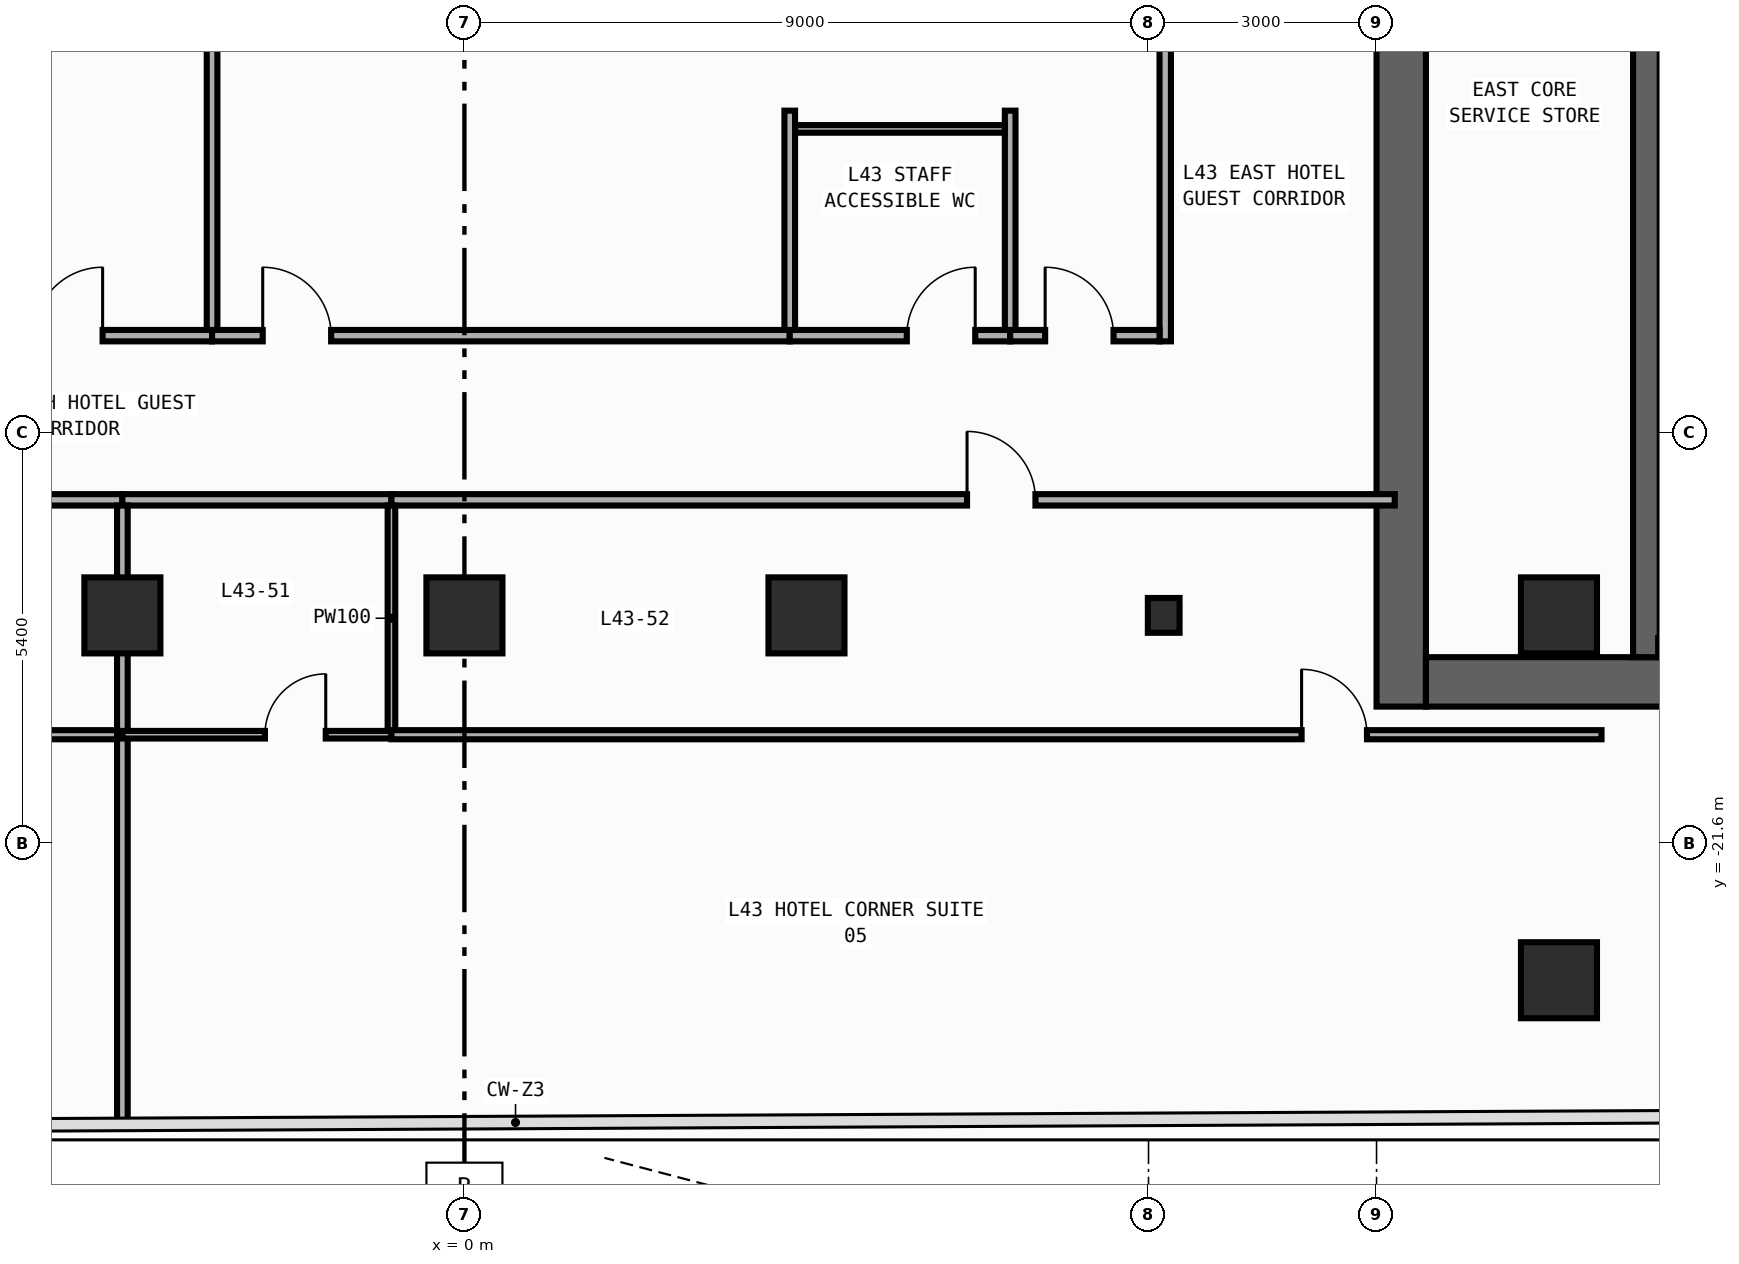
"""IFC4 building model, lengths in metres.
Left out: names, types, materials, properties, quantities, classifications, styles, units other than length and angle.
Written with IfcOpenShell. Run it as: python <this file> out.ifc"""

import sys

from ifc_helpers import new_model, si_unit, direction, frame, frame_2d, origin, origin_2d, place, context, subcontext, project, spatial, rectangle, i_section, extrude, element, fill, save


model = new_model("IFC4")
c1 = context("Model", 3, precision=1e-05, world=origin(), true_north=direction((0.0, 1.0)))
c2 = subcontext(c1, "Body", "Model", "MODEL_VIEW")
j1 = project(units=[si_unit("LENGTHUNIT", "METRE"), si_unit("PLANEANGLEUNIT", "RADIAN")], contexts=[c1])
p1 = place(None, origin())
s1 = spatial("IfcSite", under=j1, at=p1, CompositionType="ELEMENT")
p2 = place(p1, origin())
s2 = spatial("IfcBuilding", under=s1, at=p2, CompositionType="ELEMENT")
p3 = place(p2, frame((0.0, 0.0, 187.8)))
s3 = spatial("IfcBuildingStorey", under=s2, at=p3, CompositionType="ELEMENT", Elevation=187.8)
p4 = place(p3, frame((12.325, -19.8, 0.0), z_axis=(0.0, 0.0, 1.0), x_axis=(0.0, 1.0, 0.0)))
e1 = element("IfcWall", 1, at=p4, inside=s3, PredefinedType="SHEAR", context=c2, shape_type="SweptSolid", body=[
    extrude(rectangle(XDim=27.0, YDim=0.65, at=frame_2d((13.5, 0.0))), origin(), (0.0, 0.0, 1.0), 3.54),
])
p5 = place(p4, frame((23.05, 0.0, 0.0)))
e2 = element("IfcOpeningElement", 2, at=p5, cuts=e1, PredefinedType="OPENING", context=c2, shape_type="SweptSolid", body=[
    extrude(rectangle(XDim=1.1, YDim=2.2, at=frame_2d((0.55, 1.1))), frame((0.0, 0.335, 0.0), z_axis=(0.0, -1.0, 0.0), x_axis=(1.0, 0.0, 0.0)), (0.0, 0.0, 1.0), 0.67),
])
p6 = place(p4, frame((19.85, 0.0, 0.0)))
e3 = element("IfcOpeningElement", 3, at=p6, cuts=e1, PredefinedType="OPENING", context=c2, shape_type="SweptSolid", body=[
    extrude(rectangle(XDim=1.1, YDim=2.2, at=frame_2d((0.55, 1.1))), frame((0.0, 0.335, 0.0), z_axis=(0.0, -1.0, 0.0), x_axis=(1.0, 0.0, 0.0)), (0.0, 0.0, 1.0), 0.67),
])
p7 = place(p4, frame((16.65, 0.0, 0.0)))
e4 = element("IfcOpeningElement", 4, at=p7, cuts=e1, PredefinedType="OPENING", context=c2, shape_type="SweptSolid", body=[
    extrude(rectangle(XDim=1.1, YDim=2.2, at=frame_2d((0.55, 1.1))), frame((0.0, 0.335, 0.0), z_axis=(0.0, -1.0, 0.0), x_axis=(1.0, 0.0, 0.0)), (0.0, 0.0, 1.0), 0.67),
])
p8 = place(p4, frame((10.175, 0.0, 0.0)))
e5 = element("IfcOpeningElement", 5, at=p8, cuts=e1, PredefinedType="OPENING", context=c2, shape_type="SweptSolid", body=[
    extrude(rectangle(XDim=0.85, YDim=2.1, at=frame_2d((0.425, 1.05))), frame((0.0, 0.335, 0.0), z_axis=(0.0, -1.0, 0.0), x_axis=(1.0, 0.0, 0.0)), (0.0, 0.0, 1.0), 0.67),
])
p9 = place(p4, frame((12.725, 0.0, 0.0)))
e6 = element("IfcOpeningElement", 6, at=p9, cuts=e1, PredefinedType="OPENING", context=c2, shape_type="SweptSolid", body=[
    extrude(rectangle(XDim=1.15, YDim=2.2, at=frame_2d((0.575, 1.1))), frame((0.0, 0.335, 0.0), z_axis=(0.0, -1.0, 0.0), x_axis=(1.0, 0.0, 0.0)), (0.0, 0.0, 1.0), 0.67),
])
p10 = place(p4, frame((25.125, 0.0, 0.0)))
e7 = element("IfcOpeningElement", 7, at=p10, cuts=e1, PredefinedType="OPENING", context=c2, shape_type="SweptSolid", body=[
    extrude(rectangle(XDim=0.85, YDim=2.1, at=frame_2d((0.425, 1.05))), frame((0.0, 0.335, 0.0), z_axis=(0.0, -1.0, 0.0), x_axis=(1.0, 0.0, 0.0)), (0.0, 0.0, 1.0), 0.67),
])
p11 = place(p3, frame((12.65, -19.475, 0.0), z_axis=(0.0, 0.0, 1.0), x_axis=(1.0, 0.0, 0.0)))
e8 = element("IfcWall", 8, at=p11, inside=s3, PredefinedType="SHEAR", context=c2, shape_type="SweptSolid", body=[
    extrude(rectangle(XDim=7.1, YDim=0.65, at=frame_2d((3.55, 0.0))), origin(), (0.0, 0.0, 1.0), 3.54),
])
p12 = place(p3, frame((15.55, -19.15, 0.0), z_axis=(0.0, 0.0, 1.0), x_axis=(0.0, 1.0, 0.0)))
e9 = element("IfcWall", 9, at=p12, inside=s3, PredefinedType="SHEAR", context=c2, shape_type="SweptSolid", body=[
    extrude(rectangle(XDim=25.7, YDim=0.35, at=frame_2d((12.85, 0.0))), origin(), (0.0, 0.0, 1.0), 3.54),
])
p13 = place(p12, frame((12.075, 0.0, 0.0)))
e10 = element("IfcOpeningElement", 10, at=p13, cuts=e9, PredefinedType="OPENING", context=c2, shape_type="SweptSolid", body=[
    extrude(rectangle(XDim=1.15, YDim=2.2, at=frame_2d((0.575, 1.1))), frame((0.0, 0.185, 0.0), z_axis=(0.0, -1.0, 0.0), x_axis=(1.0, 0.0, 0.0)), (0.0, 0.0, 1.0), 0.37),
])
p14 = place(p12, frame((24.475, 0.0, 0.0)))
e11 = element("IfcOpeningElement", 11, at=p14, cuts=e9, PredefinedType="OPENING", context=c2, shape_type="SweptSolid", body=[
    extrude(rectangle(XDim=0.85, YDim=2.1, at=frame_2d((0.425, 1.05))), frame((0.0, 0.185, 0.0), z_axis=(0.0, -1.0, 0.0), x_axis=(1.0, 0.0, 0.0)), (0.0, 0.0, 1.0), 0.37),
])
p15 = place(p3, frame((15.705, -19.01, 0.0), z_axis=(0.0, 0.0, 1.0), x_axis=(1.0, 0.0, 0.0)))
e12 = element("IfcWall", 12, at=p15, inside=s3, PredefinedType="SHEAR", context=c2, shape_type="SweptSolid", body=[
    extrude(rectangle(XDim=4.065, YDim=0.22, at=frame_2d((2.032, 0.0))), origin(), (0.0, 0.0, 1.0), 3.54),
])
p16 = place(p3, frame((9.2, -18.6, 0.0), z_axis=(0.0, 0.0, 1.0), x_axis=(1.0, 0.0, 0.0)))
e13 = element("IfcColumn", 13, at=p16, inside=s3, PredefinedType="COLUMN", context=c2, shape_type="SweptSolid", body=[
    extrude(i_section(OverallWidth=0.417, OverallDepth=0.458, WebThickness=0.03, FlangeThickness=0.05, FilletRadius=0.022, at=origin_2d()), origin(), (0.0, 0.0, 1.0), 3.8),
])
for number, where, z_axis, x_axis in (
    (14, (14.4, -18.6, 0.0), (0.0, 0.0, 1.0), (1.0, 0.0, 0.0)),
    (15, (-4.5, -18.6, 0.0), (0.0, 0.0, 1.0), (1.0, 0.0, 0.0)),
    (16, (0.0, -18.6, 0.0), (0.0, 0.0, 1.0), (1.0, 0.0, 0.0)),
    (17, (4.5, -18.6, 0.0), (0.0, 0.0, 1.0), (1.0, 0.0, 0.0)),
    (18, (14.4, -23.4, 0.0), (0.0, 0.0, 1.0), (1.0, 0.0, 0.0)),
):
    element("IfcColumn", number, at=place(p3, frame(where, z_axis=z_axis, x_axis=x_axis)), inside=s3, PredefinedType="COLUMN", context=c2, shape_type="SweptSolid", body=[
        extrude(rectangle(XDim=1.0, YDim=1.0, at=origin_2d()), origin(), (0.0, 0.0, 1.0), 3.8),
    ])
p17 = place(p3, frame((9.22, -14.995, 0.0), z_axis=(0.0, 0.0, 1.0), x_axis=(0.0, 1.0, 0.0)))
e19 = element("IfcWall", 19, at=p17, inside=s3, PredefinedType="PARTITIONING", context=c2, shape_type="SweptSolid", body=[
    extrude(rectangle(XDim=9.195, YDim=0.15, at=frame_2d((4.598, 0.0))), origin(), (0.0, 0.0, 1.0), 2.952),
])
p18 = place(p17, frame((7.835, 0.0, 0.0)))
e20 = element("IfcOpeningElement", 20, at=p18, cuts=e19, PredefinedType="OPENING", context=c2, shape_type="SweptSolid", body=[
    extrude(rectangle(XDim=0.9, YDim=2.15, at=frame_2d((0.45, 1.075))), frame((0.0, 0.085, 0.0), z_axis=(0.0, -1.0, 0.0), x_axis=(1.0, 0.0, 0.0)), (0.0, 0.0, 1.0), 0.17),
])
p19 = place(p3, frame((-6.12, -14.92, 0.0), z_axis=(0.0, 0.0, 1.0), x_axis=(1.0, 0.0, 0.0)))
e21 = element("IfcWall", 21, at=p19, inside=s3, PredefinedType="PARTITIONING", context=c2, shape_type="SweptSolid", body=[
    extrude(rectangle(XDim=2.8, YDim=0.15, at=frame_2d((1.4, 0.0))), origin(), (0.0, 0.0, 1.0), 3.54),
])
p20 = place(p19, frame((0.46, 0.0, 0.0)))
e22 = element("IfcOpeningElement", 22, at=p20, cuts=e21, PredefinedType="OPENING", context=c2, shape_type="SweptSolid", body=[
    extrude(rectangle(XDim=0.9, YDim=2.15, at=frame_2d((0.45, 1.075))), frame((0.0, 0.085, 0.0), z_axis=(0.0, -1.0, 0.0), x_axis=(1.0, 0.0, 0.0)), (0.0, 0.0, 1.0), 0.17),
])
p21 = place(p3, frame((-3.32, -14.92, 0.0), z_axis=(0.0, 0.0, 1.0), x_axis=(1.0, 0.0, 0.0)))
e23 = element("IfcWall", 23, at=p21, inside=s3, PredefinedType="PARTITIONING", context=c2, shape_type="SweptSolid", body=[
    extrude(rectangle(XDim=7.6, YDim=0.15, at=frame_2d((3.8, 0.0))), origin(), (0.0, 0.0, 1.0), 3.54),
])
p22 = place(p21, frame((0.667, 0.0, 0.0)))
e24 = element("IfcOpeningElement", 24, at=p22, cuts=e23, PredefinedType="OPENING", context=c2, shape_type="SweptSolid", body=[
    extrude(rectangle(XDim=0.9, YDim=2.15, at=frame_2d((0.45, 1.075))), frame((0.0, 0.085, 0.0), z_axis=(0.0, -1.0, 0.0), x_axis=(1.0, 0.0, 0.0)), (0.0, 0.0, 1.0), 0.17),
])
p23 = place(p3, frame((4.28, -14.92, 0.0), z_axis=(0.0, 0.0, 1.0), x_axis=(1.0, 0.0, 0.0)))
e25 = element("IfcWall", 25, at=p23, inside=s3, PredefinedType="PARTITIONING", context=c2, shape_type="SweptSolid", body=[
    extrude(rectangle(XDim=2.9, YDim=0.15, at=frame_2d((1.45, 0.0))), origin(), (0.0, 0.0, 1.0), 3.54),
])
p24 = place(p23, frame((1.54, 0.0, 0.0)))
e26 = element("IfcOpeningElement", 26, at=p24, cuts=e25, PredefinedType="OPENING", context=c2, shape_type="SweptSolid", body=[
    extrude(rectangle(XDim=0.9, YDim=2.15, at=frame_2d((0.45, 1.075))), frame((0.0, 0.085, 0.0), z_axis=(0.0, -1.0, 0.0), x_axis=(1.0, 0.0, 0.0)), (0.0, 0.0, 1.0), 0.17),
])
p25 = place(p3, frame((7.18, -14.92, 0.0), z_axis=(0.0, 0.0, 1.0), x_axis=(1.0, 0.0, 0.0)))
e27 = element("IfcWall", 27, at=p25, inside=s3, PredefinedType="PARTITIONING", context=c2, shape_type="SweptSolid", body=[
    extrude(rectangle(XDim=1.965, YDim=0.15, at=frame_2d((0.982, 0.0))), origin(), (0.0, 0.0, 1.0), 3.54),
])
p26 = place(p25, frame((0.46, 0.0, 0.0)))
e28 = element("IfcOpeningElement", 28, at=p26, cuts=e27, PredefinedType="OPENING", context=c2, shape_type="SweptSolid", body=[
    extrude(rectangle(XDim=0.9, YDim=2.15, at=frame_2d((0.45, 1.075))), frame((0.0, 0.085, 0.0), z_axis=(0.0, -1.0, 0.0), x_axis=(1.0, 0.0, 0.0)), (0.0, 0.0, 1.0), 0.17),
])
p27 = place(p3, frame((-18.26, -17.08, 0.0), z_axis=(0.0, 0.0, 1.0), x_axis=(1.0, 0.0, 0.0)))
e29 = element("IfcWall", 29, at=p27, inside=s3, PredefinedType="PARTITIONING", context=c2, shape_type="SweptSolid", body=[
    extrude(rectangle(XDim=13.76, YDim=0.15, at=frame_2d((6.88, 0.0))), origin(), (0.0, 0.0, 1.0), 3.54),
])
p28 = place(p27, frame((0.46, 0.0, 0.0)))
e30 = element("IfcOpeningElement", 30, at=p28, cuts=e29, PredefinedType="OPENING", context=c2, shape_type="SweptSolid", body=[
    extrude(rectangle(XDim=0.9, YDim=2.15, at=frame_2d((0.45, 1.075))), frame((0.0, 0.085, 0.0), z_axis=(0.0, -1.0, 0.0), x_axis=(1.0, 0.0, 0.0)), (0.0, 0.0, 1.0), 0.17),
])
p29 = place(p3, frame((-4.5, -17.08, 0.0), z_axis=(0.0, 0.0, 1.0), x_axis=(1.0, 0.0, 0.0)))
e31 = element("IfcWall", 31, at=p29, inside=s3, PredefinedType="PARTITIONING", context=c2, shape_type="SweptSolid", body=[
    extrude(rectangle(XDim=3.54, YDim=0.15, at=frame_2d((1.77, 0.0))), origin(), (0.0, 0.0, 1.0), 3.54),
])
p30 = place(p3, frame((-0.96, -17.08, 0.0), z_axis=(0.0, 0.0, 1.0), x_axis=(1.0, 0.0, 0.0)))
e32 = element("IfcWall", 32, at=p30, inside=s3, PredefinedType="PARTITIONING", context=c2, shape_type="SweptSolid", body=[
    extrude(rectangle(XDim=13.2, YDim=0.15, at=frame_2d((6.6, 0.0))), origin(), (0.0, 0.0, 1.0), 3.54),
])
p31 = place(p30, frame((7.573, 0.0, 0.0)))
e33 = element("IfcOpeningElement", 33, at=p31, cuts=e32, PredefinedType="OPENING", context=c2, shape_type="SweptSolid", body=[
    extrude(rectangle(XDim=0.9, YDim=2.15, at=frame_2d((0.45, 1.075))), frame((0.0, 0.085, 0.0), z_axis=(0.0, -1.0, 0.0), x_axis=(1.0, 0.0, 0.0)), (0.0, 0.0, 1.0), 0.17),
])
p32 = place(p3, frame((-3.32, -14.845, 0.0), z_axis=(0.0, 0.0, 1.0), x_axis=(0.0, 1.0, 0.0)))
e34 = element("IfcWall", 34, at=p32, inside=s3, PredefinedType="PARTITIONING", context=c2, shape_type="SweptSolid", body=[
    extrude(rectangle(XDim=9.115, YDim=0.14, at=frame_2d((4.558, 0.0))), origin(), (0.0, 0.0, 1.0), 3.54),
])
for number, where, z_axis, x_axis in (
    (35, (4.28, -14.845, 0.0), (0.0, 0.0, 1.0), (0.0, 1.0, 0.0)),
    (36, (7.18, -14.845, 0.0), (0.0, 0.0, 1.0), (0.0, 1.0, 0.0)),
):
    element("IfcWall", number, at=place(p3, frame(where, z_axis=z_axis, x_axis=x_axis)), inside=s3, PredefinedType="PARTITIONING", context=c2, shape_type="SweptSolid", body=[
        extrude(rectangle(XDim=2.885, YDim=0.14, at=frame_2d((1.442, 0.0))), origin(), (0.0, 0.0, 1.0), 3.54),
    ])
p33 = place(p3, frame((-18.26, -20.17, 0.0), z_axis=(0.0, 0.0, 1.0), x_axis=(1.0, 0.0, 0.0)))
e37 = element("IfcWall", 37, at=p33, inside=s3, PredefinedType="PARTITIONING", context=c2, shape_type="SweptSolid", body=[
    extrude(rectangle(XDim=13.76, YDim=0.12, at=frame_2d((6.88, 0.0))), origin(), (0.0, 0.0, 1.0), 3.54),
])
p34 = place(p33, frame((0.46, 0.0, 0.0)))
e38 = element("IfcOpeningElement", 38, at=p34, cuts=e37, PredefinedType="OPENING", context=c2, shape_type="SweptSolid", body=[
    extrude(rectangle(XDim=0.86, YDim=2.15, at=frame_2d((0.43, 1.075))), frame((0.0, 0.07, 0.0), z_axis=(0.0, -1.0, 0.0), x_axis=(1.0, 0.0, 0.0)), (0.0, 0.0, 1.0), 0.14),
])
p35 = place(p3, frame((-4.5, -20.17, 0.0), z_axis=(0.0, 0.0, 1.0), x_axis=(0.0, 1.0, 0.0)))
e39 = element("IfcWall", 39, at=p35, inside=s3, PredefinedType="PARTITIONING", context=c2, shape_type="SweptSolid", body=[
    extrude(rectangle(XDim=3.015, YDim=0.14, at=frame_2d((1.507, 0.0))), origin(), (0.0, 0.0, 1.0), 3.54),
])
p36 = place(p3, frame((-4.5, -25.292, 0.0), z_axis=(0.0, 0.0, 1.0), x_axis=(0.0, 1.0, 0.0)))
e40 = element("IfcWall", 40, at=p36, inside=s3, PredefinedType="PARTITIONING", context=c2, shape_type="SweptSolid", body=[
    extrude(rectangle(XDim=5.122, YDim=0.14, at=frame_2d((2.561, 0.0))), origin(), (0.0, 0.0, 1.0), 3.54),
])
p37 = place(p3, frame((-0.96, -20.12, 0.0), z_axis=(0.0, 0.0, 1.0), x_axis=(0.0, 1.0, 0.0)))
e41 = element("IfcWall", 41, at=p37, inside=s3, PredefinedType="PARTITIONING", context=c2, shape_type="SweptSolid", body=[
    extrude(rectangle(XDim=2.965, YDim=0.1, at=frame_2d((1.482, 0.0))), origin(), (0.0, 0.0, 1.0), 3.54),
])
p38 = place(p3, frame((-4.5, -20.17, 0.0), z_axis=(0.0, 0.0, 1.0), x_axis=(1.0, 0.0, 0.0)))
e42 = element("IfcWall", 42, at=p38, inside=s3, PredefinedType="PARTITIONING", context=c2, shape_type="SweptSolid", body=[
    extrude(rectangle(XDim=3.54, YDim=0.1, at=frame_2d((1.77, 0.0))), origin(), (0.0, 0.0, 1.0), 3.54),
])
p39 = place(p38, frame((1.875, 0.0, 0.0)))
e43 = element("IfcOpeningElement", 43, at=p39, cuts=e42, PredefinedType="OPENING", context=c2, shape_type="SweptSolid", body=[
    extrude(rectangle(XDim=0.8, YDim=2.1, at=frame_2d((0.4, 1.05))), frame((0.0, 0.06, 0.0), z_axis=(0.0, -1.0, 0.0), x_axis=(1.0, 0.0, 0.0)), (0.0, 0.0, 1.0), 0.12),
])
p40 = place(p3, frame((-0.96, -20.17, 0.0), z_axis=(0.0, 0.0, 1.0), x_axis=(1.0, 0.0, 0.0)))
e44 = element("IfcWall", 44, at=p40, inside=s3, PredefinedType="PARTITIONING", context=c2, shape_type="SweptSolid", body=[
    extrude(rectangle(XDim=15.92, YDim=0.12, at=frame_2d((7.96, 0.0))), origin(), (0.0, 0.0, 1.0), 3.54),
])
p41 = place(p40, frame((11.974, 0.0, 0.0)))
e45 = element("IfcOpeningElement", 45, at=p41, cuts=e44, PredefinedType="OPENING", context=c2, shape_type="SweptSolid", body=[
    extrude(rectangle(XDim=0.86, YDim=2.15, at=frame_2d((0.43, 1.075))), frame((0.0, 0.07, 0.0), z_axis=(0.0, -1.0, 0.0), x_axis=(1.0, 0.0, 0.0)), (0.0, 0.0, 1.0), 0.14),
])
p42 = place(p3, frame((4.35, -12.2, 0.0), z_axis=(0.0, 0.0, 1.0), x_axis=(1.0, 0.0, 0.0)))
e46 = element("IfcWall", 46, at=p42, inside=s3, PredefinedType="PARTITIONING", context=c2, shape_type="SweptSolid", body=[
    extrude(rectangle(XDim=2.76, YDim=0.1, at=frame_2d((1.38, 0.0))), origin(), (0.0, 0.0, 1.0), 3.54),
])
p43 = place(p20, origin())
e47 = element("IfcDoor", 47, at=p43, inside=s3, OperationType="SINGLE_SWING_RIGHT", PredefinedType="DOOR", context=c2, shape_type="SweptSolid", body=[
    extrude(rectangle(XDim=0.9, YDim=2.15, at=frame_2d((0.45, 1.075))), frame((0.0, 0.025, 0.0), z_axis=(0.0, -1.0, 0.0), x_axis=(1.0, 0.0, 0.0)), (0.0, 0.0, 1.0), 0.05),
])
fill(e22, e47)
p44 = place(p22, origin())
e48 = element("IfcDoor", 48, at=p44, inside=s3, OperationType="SINGLE_SWING_LEFT", PredefinedType="DOOR", context=c2, shape_type="SweptSolid", body=[
    extrude(rectangle(XDim=0.9, YDim=2.15, at=frame_2d((0.45, 1.075))), frame((0.0, 0.025, 0.0), z_axis=(0.0, -1.0, 0.0), x_axis=(1.0, 0.0, 0.0)), (0.0, 0.0, 1.0), 0.05),
])
fill(e24, e48)
p45 = place(p24, origin())
e49 = element("IfcDoor", 49, at=p45, inside=s3, OperationType="SINGLE_SWING_RIGHT", PredefinedType="DOOR", context=c2, shape_type="SweptSolid", body=[
    extrude(rectangle(XDim=0.9, YDim=2.15, at=frame_2d((0.45, 1.075))), frame((0.0, 0.025, 0.0), z_axis=(0.0, -1.0, 0.0), x_axis=(1.0, 0.0, 0.0)), (0.0, 0.0, 1.0), 0.05),
])
fill(e26, e49)
p46 = place(p26, origin())
e50 = element("IfcDoor", 50, at=p46, inside=s3, OperationType="SINGLE_SWING_LEFT", PredefinedType="DOOR", context=c2, shape_type="SweptSolid", body=[
    extrude(rectangle(XDim=0.9, YDim=2.15, at=frame_2d((0.45, 1.075))), frame((0.0, 0.025, 0.0), z_axis=(0.0, -1.0, 0.0), x_axis=(1.0, 0.0, 0.0)), (0.0, 0.0, 1.0), 0.05),
])
fill(e28, e50)
p47 = place(p31, origin())
e51 = element("IfcDoor", 51, at=p47, inside=s3, OperationType="SINGLE_SWING_LEFT", PredefinedType="DOOR", context=c2, shape_type="SweptSolid", body=[
    extrude(rectangle(XDim=0.9, YDim=2.15, at=frame_2d((0.45, 1.075))), frame((0.0, 0.025, 0.0), z_axis=(0.0, -1.0, 0.0), x_axis=(1.0, 0.0, 0.0)), (0.0, 0.0, 1.0), 0.05),
])
fill(e33, e51)
p48 = place(p39, origin())
e52 = element("IfcDoor", 52, at=p48, inside=s3, OperationType="SINGLE_SWING_RIGHT", PredefinedType="DOOR", context=c2, shape_type="SweptSolid", body=[
    extrude(rectangle(XDim=0.8, YDim=2.1, at=frame_2d((0.4, 1.05))), frame((0.0, 0.025, 0.0), z_axis=(0.0, -1.0, 0.0), x_axis=(1.0, 0.0, 0.0)), (0.0, 0.0, 1.0), 0.05),
])
fill(e43, e52)
p49 = place(p41, origin())
e53 = element("IfcDoor", 53, at=p49, inside=s3, OperationType="SINGLE_SWING_LEFT", PredefinedType="DOOR", context=c2, shape_type="SweptSolid", body=[
    extrude(rectangle(XDim=0.86, YDim=2.15, at=frame_2d((0.43, 1.075))), frame((0.0, 0.025, 0.0), z_axis=(0.0, -1.0, 0.0), x_axis=(1.0, 0.0, 0.0)), (0.0, 0.0, 1.0), 0.05),
])
fill(e45, e53)
save(model, sys.argv[1])
